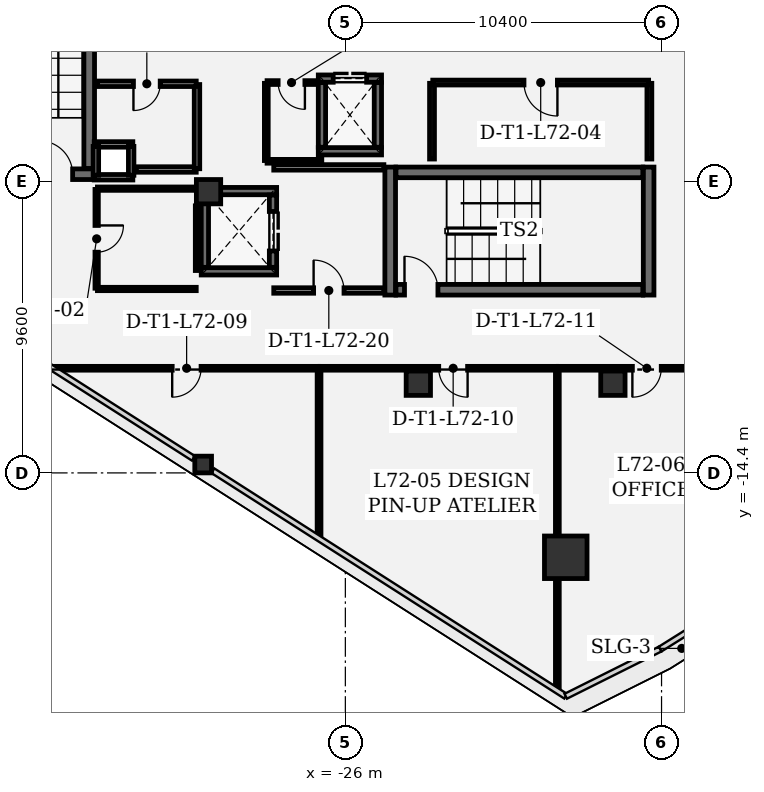
"""IFC4 building model, lengths in metres.
Left out: names, types, materials, properties, quantities, classifications, styles, units other than length and angle.
Written with IfcOpenShell. Run it as: python <this file> out.ifc"""

import sys

from ifc_helpers import new_model, si_unit, direction, frame, frame_2d, origin, origin_2d, place, context, subcontext, project, spatial, rectangle, extrude, element, fill, save


model = new_model("IFC4")
c1 = context("Model", 3, precision=1e-05, world=origin(), true_north=direction((0.0, 1.0)))
c2 = subcontext(c1, "Body", "Model", "MODEL_VIEW")
j1 = project(units=[si_unit("LENGTHUNIT", "METRE"), si_unit("PLANEANGLEUNIT", "RADIAN")], contexts=[c1])
p1 = place(None, origin())
s1 = spatial("IfcSite", under=j1, at=p1, CompositionType="ELEMENT")
p2 = place(p1, origin())
s2 = spatial("IfcBuilding", under=s1, at=p2, CompositionType="ELEMENT")
p3 = place(p2, frame((0.0, 0.0, 310.2)))
s3 = spatial("IfcBuildingStorey", under=s2, at=p3, CompositionType="ELEMENT", Elevation=310.2)
p4 = place(p3, frame((-18.75, -17.176, 0.0), z_axis=(0.0, 0.0, 1.0), x_axis=(1.0, 0.0, 0.0)))
e1 = element("IfcColumn", 1, at=p4, inside=s3, PredefinedType="COLUMN", context=c2, shape_type="SweptSolid", body=[
    extrude(rectangle(XDim=1.4, YDim=1.4, at=origin_2d()), origin(), (0.0, 0.0, 1.0), 4.2),
])
for number, where, z_axis, x_axis in (
    (2, (-17.2, -11.45, 0.0), (0.0, 0.0, 1.0), (1.0, 0.0, 0.0)),
    (3, (-23.6, -11.45, 0.0), (0.0, 0.0, 1.0), (1.0, 0.0, 0.0)),
    (4, (-30.5, -5.15, 0.0), (0.0, 0.0, 1.0), (1.0, 0.0, 0.0)),
):
    element("IfcColumn", number, at=place(p3, frame(where, z_axis=z_axis, x_axis=x_axis)), inside=s3, PredefinedType="COLUMN", context=c2, shape_type="SweptSolid", body=[
        extrude(rectangle(XDim=0.8, YDim=0.8, at=origin_2d()), origin(), (0.0, 0.0, 1.0), 4.2),
    ])
p5 = place(p3, frame((-30.677, -14.124, 0.0), z_axis=(0.0, 0.0, 1.0), x_axis=(1.0, 0.0, 0.0)))
e5 = element("IfcColumn", 5, at=p5, inside=s3, PredefinedType="COLUMN", context=c2, shape_type="SweptSolid", body=[
    extrude(rectangle(XDim=0.55, YDim=0.55, at=origin_2d()), origin(), (0.0, 0.0, 1.0), 4.2),
])
for number, where, z_axis, x_axis in (
    (6, (-24.525, -4.34, 0.0), (0.0, 0.0, 1.0), (0.0, -1.0, 0.0)),
    (7, (-16.025, -8.55, 0.0), (0.0, 0.0, 1.0), (0.0, 1.0, 0.0)),
):
    element("IfcWall", number, at=place(p3, frame(where, z_axis=z_axis, x_axis=x_axis)), inside=s3, PredefinedType="SHEAR", context=c2, shape_type="SweptSolid", body=[
        extrude(rectangle(XDim=4.21, YDim=0.35, at=frame_2d((2.105, 0.0))), origin(), (0.0, 0.0, 1.0), 3.91),
    ])
p6 = place(p3, frame((-24.335, -8.375, 0.0), z_axis=(0.0, 0.0, 1.0), x_axis=(1.0, 0.0, 0.0)))
e8 = element("IfcWall", 8, at=p6, inside=s3, PredefinedType="SHEAR", context=c2, shape_type="SweptSolid", body=[
    extrude(rectangle(XDim=8.12, YDim=0.35, at=frame_2d((4.06, 0.0))), origin(), (0.0, 0.0, 1.0), 3.91),
])
p7 = place(p6, frame((0.28, 0.0, 0.0)))
e9 = element("IfcOpeningElement", 9, at=p7, cuts=e8, PredefinedType="OPENING", context=c2, shape_type="SweptSolid", body=[
    extrude(rectangle(XDim=1.1, YDim=2.2, at=frame_2d((0.55, 1.1))), frame((0.0, 0.185, 0.0), z_axis=(0.0, -1.0, 0.0), x_axis=(1.0, 0.0, 0.0)), (0.0, 0.0, 1.0), 0.37),
])
p8 = place(p3, frame((-16.215, -4.515, 0.0), z_axis=(0.0, 0.0, 1.0), x_axis=(-1.0, 0.0, 0.0)))
e10 = element("IfcWall", 10, at=p8, inside=s3, PredefinedType="SHEAR", context=c2, shape_type="SweptSolid", body=[
    extrude(rectangle(XDim=8.12, YDim=0.35, at=frame_2d((4.06, 0.0))), origin(), (0.0, 0.0, 1.0), 3.91),
])
p9 = place(p3, frame((-38.46, -4.575, 0.0), z_axis=(0.0, 0.0, 1.0), x_axis=(1.0, 0.0, 0.0)))
e11 = element("IfcWall", 11, at=p9, inside=s3, PredefinedType="SHEAR", context=c2, shape_type="SweptSolid", body=[
    extrude(rectangle(XDim=4.21, YDim=0.35, at=frame_2d((2.105, 0.0))), origin(), (0.0, 0.0, 1.0), 3.91),
])
p10 = place(p9, frame((2.39, 0.0, 0.0)))
e12 = element("IfcOpeningElement", 12, at=p10, cuts=e11, PredefinedType="OPENING", context=c2, shape_type="SweptSolid", body=[
    extrude(rectangle(XDim=1.1, YDim=2.2, at=frame_2d((0.55, 1.1))), frame((0.0, 0.185, 0.0), z_axis=(0.0, -1.0, 0.0), x_axis=(1.0, 0.0, 0.0)), (0.0, 0.0, 1.0), 0.37),
])
p11 = place(p3, frame((-34.425, -4.385, 0.0), z_axis=(0.0, 0.0, 1.0), x_axis=(0.0, 1.0, 0.0)))
e13 = element("IfcWall", 13, at=p11, inside=s3, PredefinedType="SHEAR", context=c2, shape_type="SweptSolid", body=[
    extrude(rectangle(XDim=8.77, YDim=0.35, at=frame_2d((4.385, 0.0))), origin(), (0.0, 0.0, 1.0), 3.91),
])
for number, where, z_axis, x_axis in (
    (14, (-28.26, -7.77, 0.0), (0.0, 0.0, 1.0), (-1.0, 0.0, 0.0)),
    (15, (-30.74, -5.13, 0.0), (0.0, 0.0, 1.0), (1.0, 0.0, 0.0)),
):
    element("IfcWall", number, at=place(p3, frame(where, z_axis=z_axis, x_axis=x_axis)), inside=s3, PredefinedType="SHEAR", context=c2, shape_type="SweptSolid", body=[
        extrude(rectangle(XDim=2.48, YDim=0.24, at=frame_2d((1.24, 0.0))), origin(), (0.0, 0.0, 1.0), 3.91),
    ])
p12 = place(p3, frame((-30.62, -7.638, 0.0), z_axis=(0.0, 0.0, 1.0), x_axis=(0.0, 1.0, 0.0)))
e16 = element("IfcWall", 16, at=p12, inside=s3, PredefinedType="SHEAR", context=c2, shape_type="SweptSolid", body=[
    extrude(rectangle(XDim=2.376, YDim=0.24, at=frame_2d((1.188, 0.0))), origin(), (0.0, 0.0, 1.0), 3.91),
])
p13 = place(p3, frame((-28.38, -5.262, 0.0), z_axis=(0.0, 0.0, 1.0), x_axis=(0.0, -1.0, 0.0)))
e17 = element("IfcWall", 17, at=p13, inside=s3, PredefinedType="SHEAR", context=c2, shape_type="SweptSolid", body=[
    extrude(rectangle(XDim=2.376, YDim=0.24, at=frame_2d((1.188, 0.0))), origin(), (0.0, 0.0, 1.0), 3.91),
])
p14 = place(p13, frame((0.538, 0.0, 0.0)))
e18 = element("IfcOpeningElement", 18, at=p14, cuts=e17, PredefinedType="OPENING", context=c2, shape_type="SweptSolid", body=[
    extrude(rectangle(XDim=1.3, YDim=2.3, at=frame_2d((0.65, 1.15))), frame((0.0, 0.13, 0.0), z_axis=(0.0, -1.0, 0.0), x_axis=(1.0, 0.0, 0.0)), (0.0, 0.0, 1.0), 0.26),
])
p15 = place(p3, frame((-24.81, -3.82, 0.0), z_axis=(0.0, 0.0, 1.0), x_axis=(-1.0, 0.0, 0.0)))
e19 = element("IfcWall", 19, at=p15, inside=s3, PredefinedType="SHEAR", context=c2, shape_type="SweptSolid", body=[
    extrude(rectangle(XDim=2.08, YDim=0.24, at=frame_2d((1.04, 0.0))), origin(), (0.0, 0.0, 1.0), 3.91),
])
p16 = place(p3, frame((-26.89, -1.43, 0.0), z_axis=(0.0, 0.0, 1.0), x_axis=(1.0, 0.0, 0.0)))
e20 = element("IfcWall", 20, at=p16, inside=s3, PredefinedType="SHEAR", context=c2, shape_type="SweptSolid", body=[
    extrude(rectangle(XDim=2.08, YDim=0.24, at=frame_2d((1.04, 0.0))), origin(), (0.0, 0.0, 1.0), 3.91),
])
p17 = place(p16, frame((0.49, 0.0, 0.0)))
e21 = element("IfcOpeningElement", 21, at=p17, cuts=e20, PredefinedType="OPENING", context=c2, shape_type="SweptSolid", body=[
    extrude(rectangle(XDim=1.1, YDim=2.2, at=frame_2d((0.55, 1.1))), frame((0.0, 0.13, 0.0), z_axis=(0.0, -1.0, 0.0), x_axis=(1.0, 0.0, 0.0)), (0.0, 0.0, 1.0), 0.26),
])
for number, where, z_axis, x_axis in (
    (22, (-26.77, -3.688, 0.0), (0.0, 0.0, 1.0), (0.0, 1.0, 0.0)),
    (23, (-24.93, -1.562, 0.0), (0.0, 0.0, 1.0), (0.0, -1.0, 0.0)),
):
    element("IfcWall", number, at=place(p3, frame(where, z_axis=z_axis, x_axis=x_axis)), inside=s3, PredefinedType="SHEAR", context=c2, shape_type="SweptSolid", body=[
        extrude(rectangle(XDim=2.126, YDim=0.24, at=frame_2d((1.063, 0.0))), origin(), (0.0, 0.0, 1.0), 3.91),
    ])
for number, where, z_axis, x_axis in (
    (24, (-32.99, -4.675, 0.0), (0.0, 0.0, 1.0), (-1.0, 0.0, 0.0)),
    (25, (-34.26, -3.595, 0.0), (0.0, 0.0, 1.0), (1.0, 0.0, 0.0)),
):
    element("IfcWall", number, at=place(p3, frame(where, z_axis=z_axis, x_axis=x_axis)), inside=s3, PredefinedType="PARTITIONING", context=c2, shape_type="SweptSolid", body=[
        extrude(rectangle(XDim=1.27, YDim=0.18, at=frame_2d((0.635, 0.0))), origin(), (0.0, 0.0, 1.0), 3.91),
    ])
for number, where, z_axis, x_axis in (
    (26, (-34.205, -4.61, 0.0), (0.0, 0.0, 1.0), (0.0, 1.0, 0.0)),
    (27, (-33.045, -3.66, 0.0), (0.0, 0.0, 1.0), (0.0, -1.0, 0.0)),
):
    element("IfcWall", number, at=place(p3, frame(where, z_axis=z_axis, x_axis=x_axis)), inside=s3, PredefinedType="PARTITIONING", context=c2, shape_type="SweptSolid", body=[
        extrude(rectangle(XDim=0.95, YDim=0.18, at=frame_2d((0.475, 0.0))), origin(), (0.0, 0.0, 1.0), 3.91),
    ])
p18 = place(p3, frame((-28.355, -8.4, 0.0), z_axis=(0.0, 0.0, 1.0), x_axis=(1.0, 0.0, 0.0)))
e28 = element("IfcWall", 28, at=p18, inside=s3, PredefinedType="PARTITIONING", context=c2, shape_type="SweptSolid", body=[
    extrude(rectangle(XDim=3.622, YDim=0.18, at=frame_2d((1.811, 0.0))), origin(), (0.0, 0.0, 1.0), 3.529),
])
p19 = place(p18, frame((1.311, 0.0, 0.0)))
e29 = element("IfcOpeningElement", 29, at=p19, cuts=e28, PredefinedType="OPENING", context=c2, shape_type="SweptSolid", body=[
    extrude(rectangle(XDim=1.0, YDim=2.15, at=frame_2d((0.5, 1.075))), frame((0.0, 0.1, 0.0), z_axis=(0.0, -1.0, 0.0), x_axis=(1.0, 0.0, 0.0)), (0.0, 0.0, 1.0), 0.2),
])
p20 = place(p3, frame((-24.733, -4.35, 0.0), z_axis=(0.0, 0.0, 1.0), x_axis=(-1.0, 0.0, 0.0)))
e30 = element("IfcWall", 30, at=p20, inside=s3, PredefinedType="PARTITIONING", context=c2, shape_type="SweptSolid", body=[
    extrude(rectangle(XDim=3.622, YDim=0.18, at=frame_2d((1.811, 0.0))), origin(), (0.0, 0.0, 1.0), 3.91),
])
p21 = place(p3, frame((-34.155, -8.35, 0.0), z_axis=(0.0, 0.0, 1.0), x_axis=(1.0, 0.0, 0.0)))
e31 = element("IfcWall", 31, at=p21, inside=s3, PredefinedType="PARTITIONING", context=c2, shape_type="SweptSolid", body=[
    extrude(rectangle(XDim=3.25, YDim=0.11, at=frame_2d((1.625, 0.0))), origin(), (0.0, 0.0, 1.0), 3.13),
])
p22 = place(p3, frame((-30.88, -7.743, 0.0), z_axis=(0.0, 0.0, 1.0), x_axis=(0.0, 1.0, 0.0)))
e32 = element("IfcWall", 32, at=p22, inside=s3, PredefinedType="PARTITIONING", context=c2, shape_type="SweptSolid", body=[
    extrude(rectangle(XDim=2.128, YDim=0.11, at=frame_2d((1.064, 0.0))), origin(), (0.0, 0.0, 1.0), 3.91),
])
p23 = place(p3, frame((-30.965, -5.05, 0.0), z_axis=(0.0, 0.0, 1.0), x_axis=(-1.0, 0.0, 0.0)))
e33 = element("IfcWall", 33, at=p23, inside=s3, PredefinedType="PARTITIONING", context=c2, shape_type="SweptSolid", body=[
    extrude(rectangle(XDim=3.19, YDim=0.11, at=frame_2d((1.595, 0.0))), origin(), (0.0, 0.0, 1.0), 3.91),
])
p24 = place(p3, frame((-34.18, -5.075, 0.0), z_axis=(0.0, 0.0, 1.0), x_axis=(0.0, -1.0, 0.0)))
e34 = element("IfcWall", 34, at=p24, inside=s3, PredefinedType="PARTITIONING", context=c2, shape_type="SweptSolid", body=[
    extrude(rectangle(XDim=3.25, YDim=0.11, at=frame_2d((1.625, 0.0))), origin(), (0.0, 0.0, 1.0), 3.91),
])
p25 = place(p24, frame((1.185, 0.0, 0.0)))
e35 = element("IfcOpeningElement", 35, at=p25, cuts=e34, PredefinedType="OPENING", context=c2, shape_type="SweptSolid", body=[
    extrude(rectangle(XDim=0.88, YDim=2.1, at=frame_2d((0.44, 1.05))), frame((0.0, 0.065, 0.0), z_axis=(0.0, -1.0, 0.0), x_axis=(1.0, 0.0, 0.0)), (0.0, 0.0, 1.0), 0.13),
])
for number, where, z_axis, x_axis in (
    (36, (-23.15, -1.585, 0.0), (0.0, 0.0, 1.0), (0.0, -1.0, 0.0)),
    (37, (-16.0, -4.075, 0.0), (0.0, 0.0, 1.0), (0.0, 1.0, 0.0)),
):
    element("IfcWall", number, at=place(p3, frame(where, z_axis=z_axis, x_axis=x_axis)), inside=s3, PredefinedType="PARTITIONING", context=c2, shape_type="SweptSolid", body=[
        extrude(rectangle(XDim=2.49, YDim=0.16, at=frame_2d((1.245, 0.0))), origin(), (0.0, 0.0, 1.0), 3.91),
    ])
p26 = place(p3, frame((-16.025, -1.56, 0.0), z_axis=(0.0, 0.0, 1.0), x_axis=(-1.0, 0.0, 0.0)))
e38 = element("IfcWall", 38, at=p26, inside=s3, PredefinedType="PARTITIONING", context=c2, shape_type="SweptSolid", body=[
    extrude(rectangle(XDim=7.1, YDim=0.16, at=frame_2d((3.55, 0.0))), origin(), (0.0, 0.0, 1.0), 3.91),
])
p27 = place(p26, frame((3.0, 0.0, 0.0)))
e39 = element("IfcOpeningElement", 39, at=p27, cuts=e38, PredefinedType="OPENING", context=c2, shape_type="SweptSolid", body=[
    extrude(rectangle(XDim=1.1, YDim=2.15, at=frame_2d((0.55, 1.075))), frame((0.0, 0.09, 0.0), z_axis=(0.0, -1.0, 0.0), x_axis=(1.0, 0.0, 0.0)), (0.0, 0.0, 1.0), 0.18),
])
p28 = place(p3, frame((-28.6, -1.585, 0.0), z_axis=(0.0, 0.0, 1.0), x_axis=(0.0, -1.0, 0.0)))
e40 = element("IfcWall", 40, at=p28, inside=s3, PredefinedType="PARTITIONING", context=c2, shape_type="SweptSolid", body=[
    extrude(rectangle(XDim=2.54, YDim=0.125, at=frame_2d((1.27, 0.0))), origin(), (0.0, 0.0, 1.0), 3.91),
])
p29 = place(p3, frame((-28.575, -4.15, 0.0), z_axis=(0.0, 0.0, 1.0), x_axis=(1.0, 0.0, 0.0)))
e41 = element("IfcWall", 41, at=p29, inside=s3, PredefinedType="PARTITIONING", context=c2, shape_type="SweptSolid", body=[
    extrude(rectangle(XDim=1.8, YDim=0.125, at=frame_2d((0.9, 0.0))), origin(), (0.0, 0.0, 1.0), 3.91),
])
p30 = place(p3, frame((-26.966, -1.56, 0.0), z_axis=(0.0, 0.0, 1.0), x_axis=(-1.0, 0.0, 0.0)))
e42 = element("IfcWall", 42, at=p30, inside=s3, PredefinedType="PARTITIONING", context=c2, shape_type="SweptSolid", body=[
    extrude(rectangle(XDim=1.609, YDim=0.125, at=frame_2d((0.805, 0.0))), origin(), (0.0, 0.0, 1.0), 3.91),
])
p31 = place(p30, frame((0.365, 0.0, 0.0)))
e43 = element("IfcOpeningElement", 43, at=p31, cuts=e42, PredefinedType="OPENING", context=c2, shape_type="SweptSolid", body=[
    extrude(rectangle(XDim=0.88, YDim=2.1, at=frame_2d((0.44, 1.05))), frame((0.0, 0.073, 0.0), z_axis=(0.0, -1.0, 0.0), x_axis=(1.0, 0.0, 0.0)), (0.0, 0.0, 1.0), 0.145),
])
p32 = place(p3, frame((-32.88, -4.42, 0.0), z_axis=(0.0, 0.0, 1.0), x_axis=(1.0, 0.0, 0.0)))
e44 = element("IfcWall", 44, at=p32, inside=s3, PredefinedType="PARTITIONING", context=c2, shape_type="SweptSolid", body=[
    extrude(rectangle(XDim=1.975, YDim=0.18, at=frame_2d((0.988, 0.0))), origin(), (0.0, 0.0, 1.0), 3.91),
])
p33 = place(p3, frame((-30.88, -4.395, 0.0), z_axis=(0.0, 0.0, 1.0), x_axis=(0.0, 1.0, 0.0)))
e45 = element("IfcWall", 45, at=p33, inside=s3, PredefinedType="PARTITIONING", context=c2, shape_type="SweptSolid", body=[
    extrude(rectangle(XDim=2.77, YDim=0.18, at=frame_2d((1.385, 0.0))), origin(), (0.0, 0.0, 1.0), 3.91),
])
p34 = place(p3, frame((-30.905, -1.6, 0.0), z_axis=(0.0, 0.0, 1.0), x_axis=(-1.0, 0.0, 0.0)))
e46 = element("IfcWall", 46, at=p34, inside=s3, PredefinedType="PARTITIONING", context=c2, shape_type="SweptSolid", body=[
    extrude(rectangle(XDim=3.25, YDim=0.18, at=frame_2d((1.625, 0.0))), origin(), (0.0, 0.0, 1.0), 3.91),
])
p35 = place(p34, frame((1.185, 0.0, 0.0)))
e47 = element("IfcOpeningElement", 47, at=p35, cuts=e46, PredefinedType="OPENING", context=c2, shape_type="SweptSolid", body=[
    extrude(rectangle(XDim=0.88, YDim=2.1, at=frame_2d((0.44, 1.05))), frame((0.0, 0.1, 0.0), z_axis=(0.0, -1.0, 0.0), x_axis=(1.0, 0.0, 0.0)), (0.0, 0.0, 1.0), 0.2),
])
p36 = place(p3, frame((-26.865, -16.481, 0.0), z_axis=(0.0, 0.0, 1.0), x_axis=(0.0, 1.0, 0.0)))
e48 = element("IfcWall", 48, at=p36, inside=s3, PredefinedType="PARTITIONING", context=c2, shape_type="SweptSolid", body=[
    extrude(rectangle(XDim=5.498, YDim=0.125, at=frame_2d((2.749, 0.0))), origin(), (0.0, 0.0, 1.0), 3.529),
])
p37 = place(p3, frame((-26.89, -10.958, 0.0), z_axis=(0.0, 0.0, 1.0), x_axis=(-1.0, 0.0, 0.0)))
e49 = element("IfcWall", 49, at=p37, inside=s3, PredefinedType="PARTITIONING", context=c2, shape_type="SweptSolid", body=[
    extrude(rectangle(XDim=8.661, YDim=0.125, at=frame_2d((4.331, 0.0))), origin(), (0.0, 0.0, 1.0), 3.13),
])
p38 = place(p37, frame((3.856, 0.0, 0.0)))
e50 = element("IfcOpeningElement", 50, at=p38, cuts=e49, PredefinedType="OPENING", context=c2, shape_type="SweptSolid", body=[
    extrude(rectangle(XDim=0.95, YDim=2.15, at=frame_2d((0.475, 1.075))), frame((0.0, 0.073, 0.0), z_axis=(0.0, -1.0, 0.0), x_axis=(1.0, 0.0, 0.0)), (0.0, 0.0, 1.0), 0.145),
])
p39 = place(p3, frame((-19.052, -10.958, 0.0), z_axis=(0.0, 0.0, 1.0), x_axis=(-1.0, 0.0, 0.0)))
e51 = element("IfcWall", 51, at=p39, inside=s3, PredefinedType="PARTITIONING", context=c2, shape_type="SweptSolid", body=[
    extrude(rectangle(XDim=7.78, YDim=0.125, at=frame_2d((3.89, 0.0))), origin(), (0.0, 0.0, 1.0), 3.91),
])
p40 = place(p39, frame((2.927, 0.0, 0.0)))
e52 = element("IfcOpeningElement", 52, at=p40, cuts=e51, PredefinedType="OPENING", context=c2, shape_type="SweptSolid", body=[
    extrude(rectangle(XDim=0.95, YDim=2.15, at=frame_2d((0.475, 1.075))), frame((0.0, 0.073, 0.0), z_axis=(0.0, -1.0, 0.0), x_axis=(1.0, 0.0, 0.0)), (0.0, 0.0, 1.0), 0.145),
])
p41 = place(p3, frame((-19.027, -21.49, 0.0), z_axis=(0.0, 0.0, 1.0), x_axis=(0.0, 1.0, 0.0)))
e53 = element("IfcWall", 53, at=p41, inside=s3, PredefinedType="PARTITIONING", context=c2, shape_type="SweptSolid", body=[
    extrude(rectangle(XDim=3.55, YDim=0.125, at=frame_2d((1.775, 0.0))), origin(), (0.0, 0.0, 1.0), 3.91),
])
p42 = place(p3, frame((-19.027, -16.411, 0.0), z_axis=(0.0, 0.0, 1.0), x_axis=(0.0, 1.0, 0.0)))
e54 = element("IfcWall", 54, at=p42, inside=s3, PredefinedType="PARTITIONING", context=c2, shape_type="SweptSolid", body=[
    extrude(rectangle(XDim=5.428, YDim=0.125, at=frame_2d((2.714, 0.0))), origin(), (0.0, 0.0, 1.0), 3.91),
])
p43 = place(p3, frame((-13.175, -10.958, 0.0), z_axis=(0.0, 0.0, 1.0), x_axis=(-1.0, 0.0, 0.0)))
e55 = element("IfcWall", 55, at=p43, inside=s3, PredefinedType="PARTITIONING", context=c2, shape_type="SweptSolid", body=[
    extrude(rectangle(XDim=5.819, YDim=0.125, at=frame_2d((2.91, 0.0))), origin(), (0.0, 0.0, 1.0), 3.529),
])
p44 = place(p43, frame((2.435, 0.0, 0.0)))
e56 = element("IfcOpeningElement", 56, at=p44, cuts=e55, PredefinedType="OPENING", context=c2, shape_type="SweptSolid", body=[
    extrude(rectangle(XDim=0.95, YDim=2.15, at=frame_2d((0.475, 1.075))), frame((0.0, 0.073, 0.0), z_axis=(0.0, -1.0, 0.0), x_axis=(1.0, 0.0, 0.0)), (0.0, 0.0, 1.0), 0.145),
])
p45 = place(p7, origin())
e57 = element("IfcDoor", 57, at=p45, inside=s3, OperationType="SINGLE_SWING_LEFT", PredefinedType="DOOR", context=c2, shape_type="SweptSolid", body=[
    extrude(rectangle(XDim=1.1, YDim=2.2, at=frame_2d((0.55, 1.1))), frame((0.0, 0.025, 0.0), z_axis=(0.0, -1.0, 0.0), x_axis=(1.0, 0.0, 0.0)), (0.0, 0.0, 1.0), 0.05),
])
fill(e9, e57)
p46 = place(p10, origin())
e58 = element("IfcDoor", 58, at=p46, inside=s3, OperationType="SINGLE_SWING_LEFT", PredefinedType="DOOR", context=c2, shape_type="SweptSolid", body=[
    extrude(rectangle(XDim=1.1, YDim=2.2, at=frame_2d((0.55, 1.1))), frame((0.0, 0.025, 0.0), z_axis=(0.0, -1.0, 0.0), x_axis=(1.0, 0.0, 0.0)), (0.0, 0.0, 1.0), 0.05),
])
fill(e12, e58)
p47 = place(p14, origin())
e59 = element("IfcDoor", 59, at=p47, inside=s3, OperationType="DOUBLE_DOOR_SLIDING", PredefinedType="DOOR", context=c2, shape_type="SweptSolid", body=[
    extrude(rectangle(XDim=1.3, YDim=2.3, at=frame_2d((0.65, 1.15))), frame((0.0, 0.025, 0.0), z_axis=(0.0, -1.0, 0.0), x_axis=(1.0, 0.0, 0.0)), (0.0, 0.0, 1.0), 0.05),
])
fill(e18, e59)
p48 = place(p17, origin())
e60 = element("IfcDoor", 60, at=p48, inside=s3, OperationType="DOUBLE_DOOR_SLIDING", PredefinedType="DOOR", context=c2, shape_type="SweptSolid", body=[
    extrude(rectangle(XDim=1.1, YDim=2.2, at=frame_2d((0.55, 1.1))), frame((0.0, 0.025, 0.0), z_axis=(0.0, -1.0, 0.0), x_axis=(1.0, 0.0, 0.0)), (0.0, 0.0, 1.0), 0.05),
])
fill(e21, e60)
p49 = place(p25, origin())
e61 = element("IfcDoor", 61, at=p49, inside=s3, OperationType="SINGLE_SWING_LEFT", PredefinedType="DOOR", context=c2, shape_type="SweptSolid", body=[
    extrude(rectangle(XDim=0.88, YDim=2.1, at=frame_2d((0.44, 1.05))), frame((0.0, 0.025, 0.0), z_axis=(0.0, -1.0, 0.0), x_axis=(1.0, 0.0, 0.0)), (0.0, 0.0, 1.0), 0.05),
])
fill(e35, e61)
p50 = place(p27, origin())
e62 = element("IfcDoor", 62, at=p50, inside=s3, OperationType="SINGLE_SWING_LEFT", PredefinedType="DOOR", context=c2, shape_type="SweptSolid", body=[
    extrude(rectangle(XDim=1.1, YDim=2.15, at=frame_2d((0.55, 1.075))), frame((0.0, 0.025, 0.0), z_axis=(0.0, -1.0, 0.0), x_axis=(1.0, 0.0, 0.0)), (0.0, 0.0, 1.0), 0.05),
])
fill(e39, e62)
p51 = place(p31, origin())
e63 = element("IfcDoor", 63, at=p51, inside=s3, OperationType="SINGLE_SWING_LEFT", PredefinedType="DOOR", context=c2, shape_type="SweptSolid", body=[
    extrude(rectangle(XDim=0.88, YDim=2.1, at=frame_2d((0.44, 1.05))), frame((0.0, 0.025, 0.0), z_axis=(0.0, -1.0, 0.0), x_axis=(1.0, 0.0, 0.0)), (0.0, 0.0, 1.0), 0.05),
])
fill(e43, e63)
p52 = place(p35, origin())
e64 = element("IfcDoor", 64, at=p52, inside=s3, OperationType="SINGLE_SWING_RIGHT", PredefinedType="DOOR", context=c2, shape_type="SweptSolid", body=[
    extrude(rectangle(XDim=0.88, YDim=2.1, at=frame_2d((0.44, 1.05))), frame((0.0, 0.025, 0.0), z_axis=(0.0, -1.0, 0.0), x_axis=(1.0, 0.0, 0.0)), (0.0, 0.0, 1.0), 0.05),
])
fill(e47, e64)
p53 = place(p38, origin())
e65 = element("IfcDoor", 65, at=p53, inside=s3, OperationType="SINGLE_SWING_RIGHT", PredefinedType="DOOR", context=c2, shape_type="SweptSolid", body=[
    extrude(rectangle(XDim=0.95, YDim=2.15, at=frame_2d((0.475, 1.075))), frame((0.0, 0.025, 0.0), z_axis=(0.0, -1.0, 0.0), x_axis=(1.0, 0.0, 0.0)), (0.0, 0.0, 1.0), 0.05),
])
fill(e50, e65)
p54 = place(p40, origin())
e66 = element("IfcDoor", 66, at=p54, inside=s3, OperationType="SINGLE_SWING_LEFT", PredefinedType="DOOR", context=c2, shape_type="SweptSolid", body=[
    extrude(rectangle(XDim=0.95, YDim=2.15, at=frame_2d((0.475, 1.075))), frame((0.0, 0.025, 0.0), z_axis=(0.0, -1.0, 0.0), x_axis=(1.0, 0.0, 0.0)), (0.0, 0.0, 1.0), 0.05),
])
fill(e52, e66)
p55 = place(p44, origin())
e67 = element("IfcDoor", 67, at=p55, inside=s3, OperationType="SINGLE_SWING_RIGHT", PredefinedType="DOOR", context=c2, shape_type="SweptSolid", body=[
    extrude(rectangle(XDim=0.95, YDim=2.15, at=frame_2d((0.475, 1.075))), frame((0.0, 0.025, 0.0), z_axis=(0.0, -1.0, 0.0), x_axis=(1.0, 0.0, 0.0)), (0.0, 0.0, 1.0), 0.05),
])
fill(e56, e67)
p56 = place(p19, origin())
e68 = element("IfcDoor", 68, at=p56, inside=s3, OperationType="SINGLE_SWING_LEFT", PredefinedType="DOOR", context=c2, shape_type="SweptSolid", body=[
    extrude(rectangle(XDim=1.0, YDim=2.15, at=frame_2d((0.5, 1.075))), frame((0.0, 0.025, 0.0), z_axis=(0.0, -1.0, 0.0), x_axis=(1.0, 0.0, 0.0)), (0.0, 0.0, 1.0), 0.05),
])
fill(e29, e68)
save(model, sys.argv[1])
